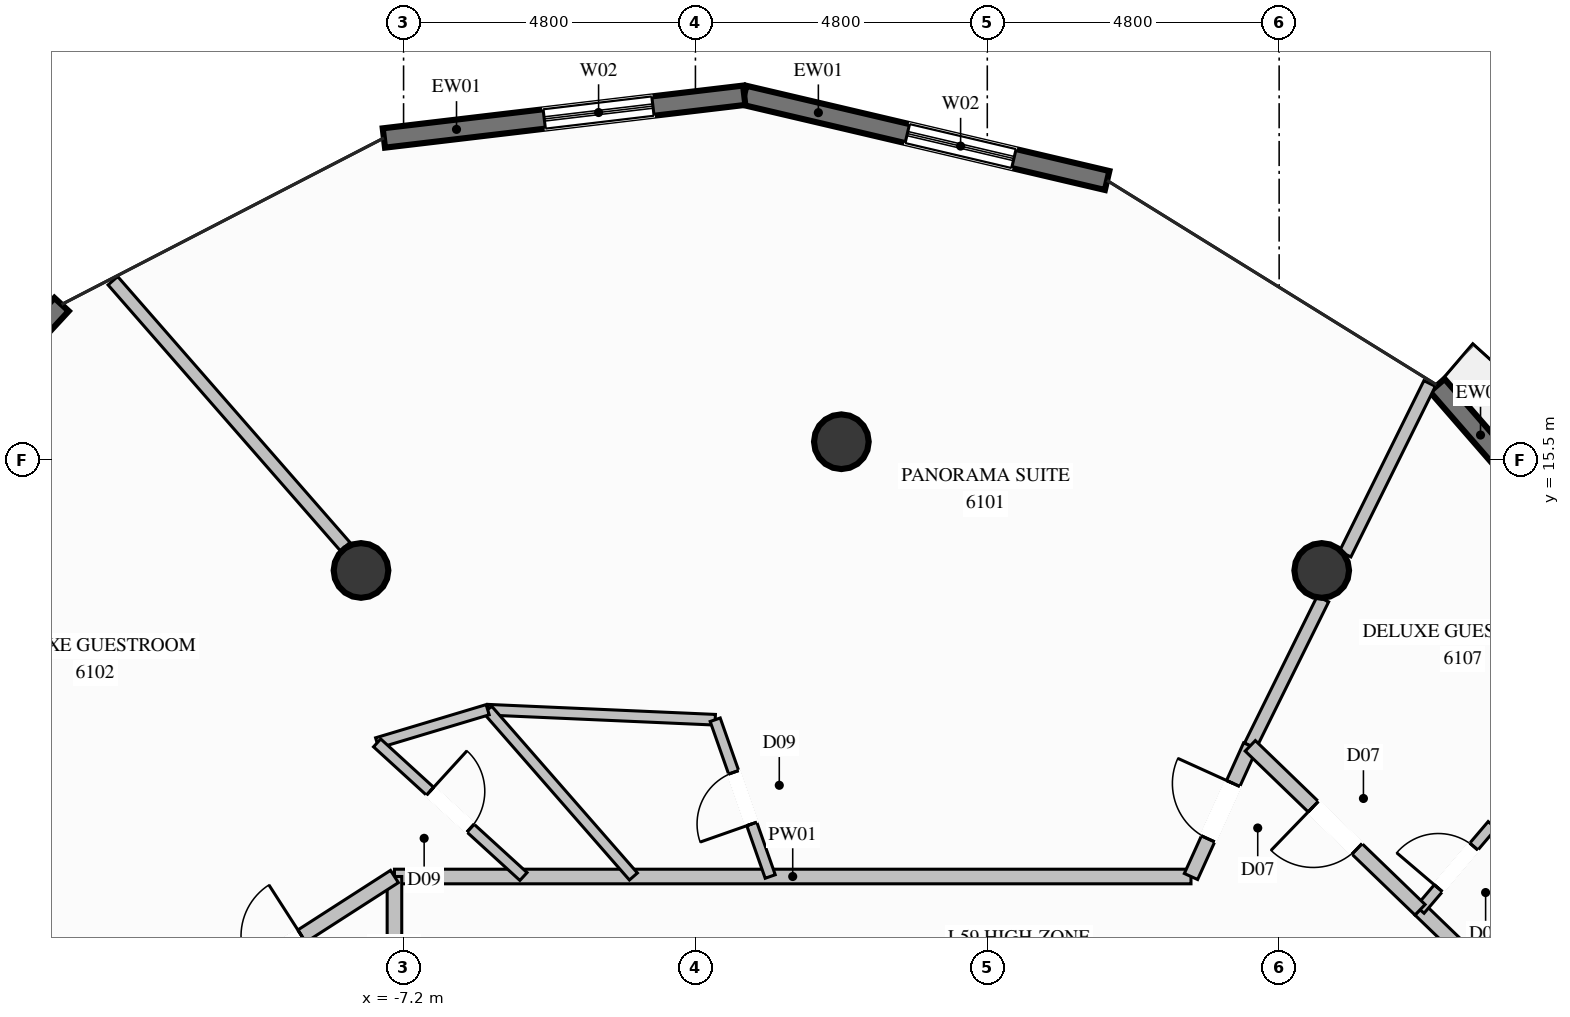
"""IFC4 building model, lengths in metres.
Left out: names, types, materials, properties, quantities, classifications, styles, units other than length and angle.
Written with IfcOpenShell. Run it as: python <this file> out.ifc"""

import sys

from ifc_helpers import new_model, si_unit, direction, frame, frame_2d, origin, origin_2d, place, context, subcontext, project, spatial, rectangle, circle, extrude, element, fill, save


model = new_model("IFC4")
c1 = context("Model", 3, precision=1e-05, world=origin(), true_north=direction((0.0, 1.0)))
c2 = subcontext(c1, "Body", "Model", "MODEL_VIEW")
j1 = project(units=[si_unit("LENGTHUNIT", "METRE"), si_unit("PLANEANGLEUNIT", "RADIAN")], contexts=[c1])
p1 = place(None, origin())
s1 = spatial("IfcSite", under=j1, at=p1, CompositionType="ELEMENT")
p2 = place(p1, origin())
s2 = spatial("IfcBuilding", under=s1, at=p2, CompositionType="ELEMENT")
p3 = place(p2, frame((0.0, 0.0, 227.2)))
s3 = spatial("IfcBuildingStorey", under=s2, at=p3, CompositionType="ELEMENT", Elevation=227.2)
for number, where, z_axis, x_axis in (
    (1, (7.9, 13.683, 0.0), (0.0, 0.0, 1.0), (1.0, 0.0, 0.0)),
    (2, (0.0, 15.8, 0.0), (0.0, 0.0, 1.0), (1.0, 0.0, 0.0)),
    (3, (-7.9, 13.683, 0.0), (0.0, 0.0, 1.0), (1.0, 0.0, 0.0)),
):
    element("IfcColumn", number, at=place(p3, frame(where, z_axis=z_axis, x_axis=x_axis)), inside=s3, PredefinedType="COLUMN", context=c2, shape_type="SweptSolid", body=[
        extrude(circle(Radius=0.45, at=origin_2d()), origin(), (0.0, 0.0, 1.0), 3.6),
    ])
p4 = place(p3, frame((9.8, 16.728, 0.0), z_axis=(0.0, 0.0, 1.0), x_axis=(0.656431844165, -0.754385335201, 0.0)))
e4 = element("IfcWall", 4, at=p4, inside=s3, PredefinedType="SOLIDWALL", context=c2, shape_type="SweptSolid", body=[
    extrude(rectangle(XDim=6.637, YDim=0.32, at=frame_2d((3.319, 0.0))), origin(), (0.0, 0.0, 1.0), 3.36),
])
p5 = place(p4, frame((2.419, 0.0, 0.35)))
e5 = element("IfcOpeningElement", 5, at=p5, cuts=e4, PredefinedType="OPENING", context=c2, shape_type="SweptSolid", body=[
    extrude(rectangle(XDim=1.8, YDim=2.6, at=frame_2d((0.9, 1.3))), frame((0.0, 0.17, 0.0), z_axis=(0.0, -1.0, 0.0), x_axis=(1.0, 0.0, 0.0)), (0.0, 0.0, 1.0), 0.34),
])
p6 = place(p3, frame((-1.598, 21.498, 0.0), z_axis=(0.0, 0.0, 1.0), x_axis=(0.973503262374, -0.22867312511, 0.0)))
e6 = element("IfcWall", 6, at=p6, inside=s3, PredefinedType="SOLIDWALL", context=c2, shape_type="SweptSolid", body=[
    extrude(rectangle(XDim=6.131, YDim=0.32, at=frame_2d((3.066, 0.0))), origin(), (0.0, 0.0, 1.0), 3.36),
])
p7 = place(p6, frame((2.756, 0.0, 0.35)))
e7 = element("IfcOpeningElement", 7, at=p7, cuts=e6, PredefinedType="OPENING", context=c2, shape_type="SweptSolid", body=[
    extrude(rectangle(XDim=1.8, YDim=2.6, at=frame_2d((0.9, 1.3))), frame((0.0, 0.17, 0.0), z_axis=(0.0, -1.0, 0.0), x_axis=(1.0, 0.0, 0.0)), (0.0, 0.0, 1.0), 0.34),
])
p8 = place(p3, frame((-7.524, 20.795, 0.0), z_axis=(0.0, 0.0, 1.0), x_axis=(0.993034505957, 0.117823893921, 0.0)))
e8 = element("IfcWall", 8, at=p8, inside=s3, PredefinedType="SOLIDWALL", context=c2, shape_type="SweptSolid", body=[
    extrude(rectangle(XDim=5.968, YDim=0.32, at=frame_2d((2.984, 0.0))), origin(), (0.0, 0.0, 1.0), 3.36),
])
p9 = place(p8, frame((2.656, 0.0, 0.35)))
e9 = element("IfcOpeningElement", 9, at=p9, cuts=e8, PredefinedType="OPENING", context=c2, shape_type="SweptSolid", body=[
    extrude(rectangle(XDim=1.8, YDim=2.6, at=frame_2d((0.9, 1.3))), frame((0.0, 0.17, 0.0), z_axis=(0.0, -1.0, 0.0), x_axis=(1.0, 0.0, 0.0)), (0.0, 0.0, 1.0), 0.34),
])
p10 = place(p3, frame((-16.984, 13.551, 0.0), z_axis=(0.0, 0.0, 1.0), x_axis=(0.678251989905, 0.734829393935, 0.0)))
e10 = element("IfcWall", 10, at=p10, inside=s3, PredefinedType="SOLIDWALL", context=c2, shape_type="SweptSolid", body=[
    extrude(rectangle(XDim=6.132, YDim=0.32, at=frame_2d((3.066, 0.0))), origin(), (0.0, 0.0, 1.0), 3.36),
])
p11 = place(p10, frame((2.166, 0.0, 0.35)))
e11 = element("IfcOpeningElement", 11, at=p11, cuts=e10, PredefinedType="OPENING", context=c2, shape_type="SweptSolid", body=[
    extrude(rectangle(XDim=1.8, YDim=2.6, at=frame_2d((0.9, 1.3))), frame((0.0, 0.17, 0.0), z_axis=(0.0, -1.0, 0.0), x_axis=(1.0, 0.0, 0.0)), (0.0, 0.0, 1.0), 0.34),
])
p12 = place(p3, frame((-7.35, 8.65, 0.0), z_axis=(0.0, 0.0, 1.0), x_axis=(1.0, 0.0, 0.0)))
e12 = element("IfcWall", 12, at=p12, inside=s3, PredefinedType="PARTITIONING", context=c2, shape_type="SweptSolid", body=[
    extrude(rectangle(XDim=13.1, YDim=0.24, at=frame_2d((6.55, 0.0))), origin(), (0.0, 0.0, 1.0), 3.36),
])
p13 = place(p3, frame((-7.35, 4.95, 0.0), z_axis=(0.0, 0.0, 1.0), x_axis=(0.0, 1.0, 0.0)))
e13 = element("IfcWall", 13, at=p13, inside=s3, PredefinedType="PARTITIONING", context=c2, shape_type="SweptSolid", body=[
    extrude(rectangle(XDim=3.7, YDim=0.24, at=frame_2d((1.85, 0.0))), origin(), (0.0, 0.0, 1.0), 2.445),
])
p14 = place(p3, frame((6.725, 10.799, 0.0), z_axis=(0.0, 0.0, 1.0), x_axis=(0.443620421332, 0.896214774358, 0.0)))
e14 = element("IfcWall", 14, at=p14, inside=s3, PredefinedType="PARTITIONING", context=c2, shape_type="SweptSolid", body=[
    extrude(rectangle(XDim=2.693, YDim=0.21, at=frame_2d((1.347, 0.0))), origin(), (0.0, 0.0, 1.0), 2.876),
])
p15 = place(p3, frame((8.286, 13.952, 0.0), z_axis=(0.0, 0.0, 1.0), x_axis=(0.443654587732, 0.896197861404, 0.0)))
e15 = element("IfcWall", 15, at=p15, inside=s3, PredefinedType="PARTITIONING", context=c2, shape_type="SweptSolid", body=[
    extrude(rectangle(XDim=3.131, YDim=0.21, at=frame_2d((1.565, 0.0))), origin(), (0.0, 0.0, 1.0), 3.36),
])
p16 = place(p3, frame((-5.817, 11.393, 0.0), z_axis=(0.0, 0.0, 1.0), x_axis=(0.999028783545, -0.044062338206, 0.0)))
e16 = element("IfcWall", 16, at=p16, inside=s3, PredefinedType="PLUMBINGWALL", context=c2, shape_type="SweptSolid", body=[
    extrude(rectangle(XDim=3.746, YDim=0.175, at=frame_2d((1.873, 0.0))), origin(), (0.0, 0.0, 1.0), 3.36),
])
p17 = place(p3, frame((-5.817, 11.393, 0.0), z_axis=(0.0, 0.0, 1.0), x_axis=(0.657992027161, -0.753024894803, 0.0)))
e17 = element("IfcWall", 17, at=p17, inside=s3, PredefinedType="PLUMBINGWALL", context=c2, shape_type="SweptSolid", body=[
    extrude(rectangle(XDim=3.643, YDim=0.175, at=frame_2d((1.821, 0.0))), origin(), (0.0, 0.0, 1.0), 3.36),
])
p18 = place(p3, frame((-1.17, 8.65, 0.0), z_axis=(0.0, 0.0, 1.0), x_axis=(-0.331225887152, 0.943551488622, 0.0)))
e18 = element("IfcWall", 18, at=p18, inside=s3, PredefinedType="PLUMBINGWALL", context=c2, shape_type="SweptSolid", body=[
    extrude(rectangle(XDim=2.732, YDim=0.175, at=frame_2d((1.366, 0.0))), origin(), (0.0, 0.0, 1.0), 3.36),
])
p19 = place(p18, frame((0.916, 0.0, 0.0)))
e19 = element("IfcOpeningElement", 19, at=p19, cuts=e18, PredefinedType="OPENING", context=c2, shape_type="SweptSolid", body=[
    extrude(rectangle(XDim=0.9, YDim=2.1, at=frame_2d((0.45, 1.05))), frame((0.0, 0.098, 0.0), z_axis=(0.0, -1.0, 0.0), x_axis=(1.0, 0.0, 0.0)), (0.0, 0.0, 1.0), 0.195),
])
p20 = place(p3, frame((-8.16, 14.075, 0.0), z_axis=(0.0, 0.0, 1.0), x_axis=(-0.657980612498, 0.753034868766, 0.0)))
e20 = element("IfcWall", 20, at=p20, inside=s3, PredefinedType="PARTITIONING", context=c2, shape_type="SweptSolid", body=[
    extrude(rectangle(XDim=5.807, YDim=0.21, at=frame_2d((2.904, 0.0))), origin(), (0.0, 0.0, 1.0), 3.36),
])
p21 = place(p3, frame((5.75, 8.65, 0.0), z_axis=(0.0, 0.0, 1.0), x_axis=(0.413171528251, 0.910653220629, 0.0)))
e21 = element("IfcWall", 21, at=p21, inside=s3, PredefinedType="PARTITIONING", context=c2, shape_type="SweptSolid", body=[
    extrude(rectangle(XDim=2.36, YDim=0.24, at=frame_2d((1.18, 0.0))), origin(), (0.0, 0.0, 1.0), 2.876),
])
p22 = place(p21, frame((0.68, 0.0, 0.0)))
e22 = element("IfcOpeningElement", 22, at=p22, cuts=e21, PredefinedType="OPENING", context=c2, shape_type="SweptSolid", body=[
    extrude(rectangle(XDim=1.0, YDim=2.2, at=frame_2d((0.5, 1.1))), frame((0.0, 0.13, 0.0), z_axis=(0.0, -1.0, 0.0), x_axis=(1.0, 0.0, 0.0)), (0.0, 0.0, 1.0), 0.26),
])
p23 = place(p3, frame((-7.635, 10.847, 0.0), z_axis=(0.0, 0.0, 1.0), x_axis=(0.95772357585, 0.287690028089, 0.0)))
e23 = element("IfcWall", 23, at=p23, inside=s3, PredefinedType="PLUMBINGWALL", context=c2, shape_type="SweptSolid", body=[
    extrude(rectangle(XDim=1.898, YDim=0.175, at=frame_2d((0.949, 0.0))), origin(), (0.0, 0.0, 1.0), 3.36),
])
p24 = place(p3, frame((-7.635, 10.847, 0.0), z_axis=(0.0, 0.0, 1.0), x_axis=(0.738586041598, -0.674159223891, 0.0)))
e24 = element("IfcWall", 24, at=p24, inside=s3, PredefinedType="PLUMBINGWALL", context=c2, shape_type="SweptSolid", body=[
    extrude(rectangle(XDim=3.259, YDim=0.175, at=frame_2d((1.629, 0.0))), origin(), (0.0, 0.0, 1.0), 3.36),
])
p25 = place(p24, frame((1.179, 0.0, 0.0)))
e25 = element("IfcOpeningElement", 25, at=p25, cuts=e24, PredefinedType="OPENING", context=c2, shape_type="SweptSolid", body=[
    extrude(rectangle(XDim=0.9, YDim=2.1, at=frame_2d((0.45, 1.05))), frame((0.0, 0.098, 0.0), z_axis=(0.0, -1.0, 0.0), x_axis=(1.0, 0.0, 0.0)), (0.0, 0.0, 1.0), 0.195),
])
p26 = place(p3, frame((-11.238, 6.15, 0.0), z_axis=(0.0, 0.0, 1.0), x_axis=(0.841118406986, 0.540851019625, 0.0)))
e26 = element("IfcWall", 26, at=p26, inside=s3, PredefinedType="PARTITIONING", context=c2, shape_type="SweptSolid", body=[
    extrude(rectangle(XDim=4.622, YDim=0.24, at=frame_2d((2.311, 0.0))), origin(), (0.0, 0.0, 1.0), 3.36),
])
p27 = place(p26, frame((1.811, 0.0, 0.0)))
e27 = element("IfcOpeningElement", 27, at=p27, cuts=e26, PredefinedType="OPENING", context=c2, shape_type="SweptSolid", body=[
    extrude(rectangle(XDim=1.0, YDim=2.2, at=frame_2d((0.5, 1.1))), frame((0.0, 0.13, 0.0), z_axis=(0.0, -1.0, 0.0), x_axis=(1.0, 0.0, 0.0)), (0.0, 0.0, 1.0), 0.26),
])
p28 = place(p3, frame((11.538, 6.15, 0.0), z_axis=(0.0, 0.0, 1.0), x_axis=(-0.719078080202, 0.694929287463, 0.0)))
e28 = element("IfcWall", 28, at=p28, inside=s3, PredefinedType="PARTITIONING", context=c2, shape_type="SweptSolid", body=[
    extrude(rectangle(XDim=2.811, YDim=0.24, at=frame_2d((1.405, 0.0))), origin(), (0.0, 0.0, 1.0), 3.36),
])
p29 = place(p3, frame((12.859, 7.086, 0.0), z_axis=(0.0, 0.0, 1.0), x_axis=(-0.666357777504, 0.745632156201, 0.0)))
e29 = element("IfcWall", 29, at=p29, inside=s3, PredefinedType="PLUMBINGWALL", context=c2, shape_type="SweptSolid", body=[
    extrude(rectangle(XDim=3.234, YDim=0.175, at=frame_2d((1.617, 0.0))), origin(), (0.0, 0.0, 1.0), 3.36),
])
p30 = place(p3, frame((9.517, 8.103, 0.0), z_axis=(0.0, 0.0, 1.0), x_axis=(0.64830617709, 0.76137973492, 0.0)))
e30 = element("IfcWall", 30, at=p30, inside=s3, PredefinedType="PLUMBINGWALL", context=c2, shape_type="SweptSolid", body=[
    extrude(rectangle(XDim=1.831, YDim=0.175, at=frame_2d((0.916, 0.0))), origin(), (0.0, 0.0, 1.0), 3.36),
])
p31 = place(p30, frame((0.465, 0.0, 0.0)))
e31 = element("IfcOpeningElement", 31, at=p31, cuts=e30, PredefinedType="OPENING", context=c2, shape_type="SweptSolid", body=[
    extrude(rectangle(XDim=0.9, YDim=2.1, at=frame_2d((0.45, 1.05))), frame((0.0, 0.098, 0.0), z_axis=(0.0, -1.0, 0.0), x_axis=(1.0, 0.0, 0.0)), (0.0, 0.0, 1.0), 0.195),
])
p32 = place(p3, frame((9.517, 8.103, 0.0), z_axis=(0.0, 0.0, 1.0), x_axis=(-0.719359188441, 0.694638292931, 0.0)))
e32 = element("IfcWall", 32, at=p32, inside=s3, PredefinedType="PARTITIONING", context=c2, shape_type="SweptSolid", body=[
    extrude(rectangle(XDim=3.881, YDim=0.24, at=frame_2d((1.94, 0.0))), origin(), (0.0, 0.0, 1.0), 3.36),
])
p33 = place(p32, frame((1.441, 0.0, 0.0)))
e33 = element("IfcOpeningElement", 33, at=p33, cuts=e32, PredefinedType="OPENING", context=c2, shape_type="SweptSolid", body=[
    extrude(rectangle(XDim=1.0, YDim=2.2, at=frame_2d((0.5, 1.1))), frame((0.0, 0.13, 0.0), z_axis=(0.0, -1.0, 0.0), x_axis=(1.0, 0.0, 0.0)), (0.0, 0.0, 1.0), 0.26),
])
p34 = place(p7, origin())
e34 = element("IfcWindow", 34, at=p34, inside=s3, PartitioningType="SINGLE_PANEL", PredefinedType="WINDOW", context=c2, shape_type="SweptSolid", body=[
    extrude(rectangle(XDim=1.8, YDim=2.6, at=frame_2d((0.9, 1.3))), frame((0.0, 0.03, 0.0), z_axis=(0.0, -1.0, 0.0), x_axis=(1.0, 0.0, 0.0)), (0.0, 0.0, 1.0), 0.06),
])
fill(e7, e34)
p35 = place(p9, origin())
e35 = element("IfcWindow", 35, at=p35, inside=s3, PartitioningType="SINGLE_PANEL", PredefinedType="WINDOW", context=c2, shape_type="SweptSolid", body=[
    extrude(rectangle(XDim=1.8, YDim=2.6, at=frame_2d((0.9, 1.3))), frame((0.0, 0.03, 0.0), z_axis=(0.0, -1.0, 0.0), x_axis=(1.0, 0.0, 0.0)), (0.0, 0.0, 1.0), 0.06),
])
fill(e9, e35)
p36 = place(p19, origin())
e36 = element("IfcDoor", 36, at=p36, inside=s3, OperationType="SINGLE_SWING_LEFT", PredefinedType="DOOR", context=c2, shape_type="SweptSolid", body=[
    extrude(rectangle(XDim=0.9, YDim=2.1, at=frame_2d((0.45, 1.05))), frame((0.0, 0.025, 0.0), z_axis=(0.0, -1.0, 0.0), x_axis=(1.0, 0.0, 0.0)), (0.0, 0.0, 1.0), 0.05),
])
fill(e19, e36)
p37 = place(p22, origin())
e37 = element("IfcDoor", 37, at=p37, inside=s3, OperationType="SINGLE_SWING_RIGHT", PredefinedType="DOOR", context=c2, shape_type="SweptSolid", body=[
    extrude(rectangle(XDim=1.0, YDim=2.2, at=frame_2d((0.5, 1.1))), frame((0.0, 0.025, 0.0), z_axis=(0.0, -1.0, 0.0), x_axis=(1.0, 0.0, 0.0)), (0.0, 0.0, 1.0), 0.05),
])
fill(e22, e37)
p38 = place(p25, origin())
e38 = element("IfcDoor", 38, at=p38, inside=s3, OperationType="SINGLE_SWING_LEFT", PredefinedType="DOOR", context=c2, shape_type="SweptSolid", body=[
    extrude(rectangle(XDim=0.9, YDim=2.1, at=frame_2d((0.45, 1.05))), frame((0.0, 0.025, 0.0), z_axis=(0.0, -1.0, 0.0), x_axis=(1.0, 0.0, 0.0)), (0.0, 0.0, 1.0), 0.05),
])
fill(e25, e38)
p39 = place(p27, origin())
e39 = element("IfcDoor", 39, at=p39, inside=s3, OperationType="SINGLE_SWING_RIGHT", PredefinedType="DOOR", context=c2, shape_type="SweptSolid", body=[
    extrude(rectangle(XDim=1.0, YDim=2.2, at=frame_2d((0.5, 1.1))), frame((0.0, 0.025, 0.0), z_axis=(0.0, -1.0, 0.0), x_axis=(1.0, 0.0, 0.0)), (0.0, 0.0, 1.0), 0.05),
])
fill(e27, e39)
p40 = place(p31, origin())
e40 = element("IfcDoor", 40, at=p40, inside=s3, OperationType="SINGLE_SWING_LEFT", PredefinedType="DOOR", context=c2, shape_type="SweptSolid", body=[
    extrude(rectangle(XDim=0.9, YDim=2.1, at=frame_2d((0.45, 1.05))), frame((0.0, 0.025, 0.0), z_axis=(0.0, -1.0, 0.0), x_axis=(1.0, 0.0, 0.0)), (0.0, 0.0, 1.0), 0.05),
])
fill(e31, e40)
p41 = place(p33, origin())
e41 = element("IfcDoor", 41, at=p41, inside=s3, OperationType="SINGLE_SWING_RIGHT", PredefinedType="DOOR", context=c2, shape_type="SweptSolid", body=[
    extrude(rectangle(XDim=1.0, YDim=2.2, at=frame_2d((0.5, 1.1))), frame((0.0, 0.025, 0.0), z_axis=(0.0, -1.0, 0.0), x_axis=(1.0, 0.0, 0.0)), (0.0, 0.0, 1.0), 0.05),
])
fill(e33, e41)
save(model, sys.argv[1])
